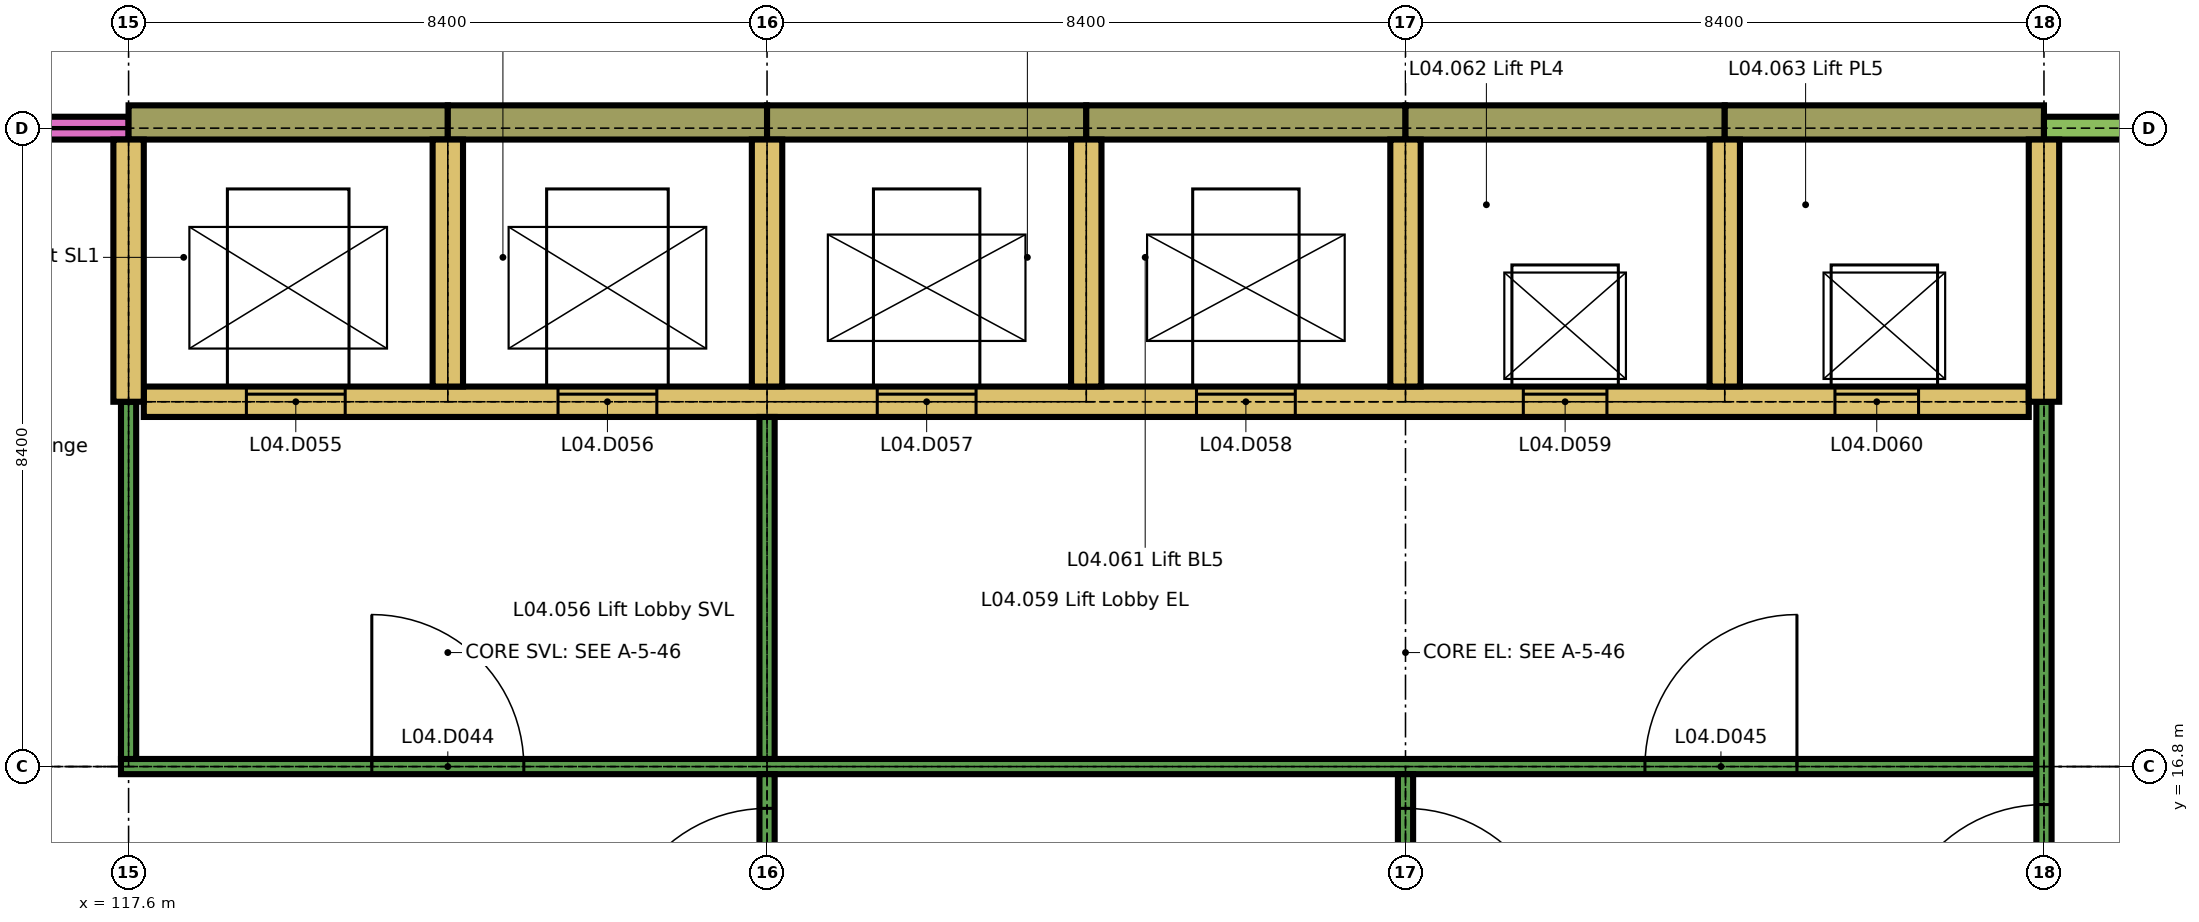
"""IFC4 building model, lengths in metres.
Left out: names, types, materials, properties, quantities, classifications, styles, units other than length and angle.
Written with IfcOpenShell. Run it as: python <this file> out.ifc"""

import sys

from ifc_helpers import new_model, si_unit, direction, frame, frame_2d, origin, place, context, subcontext, project, spatial, rectangle, extrude, element, fill, save


model = new_model("IFC4")
c1 = context("Model", 3, precision=1e-05, world=origin(), true_north=direction((0.0, 1.0)))
c2 = subcontext(c1, "Body", "Model", "MODEL_VIEW")
j1 = project(units=[si_unit("LENGTHUNIT", "METRE"), si_unit("PLANEANGLEUNIT", "RADIAN")], contexts=[c1])
p1 = place(None, origin())
s1 = spatial("IfcSite", under=j1, at=p1, CompositionType="ELEMENT")
p2 = place(p1, origin())
s2 = spatial("IfcBuilding", under=s1, at=p2, CompositionType="ELEMENT")
p3 = place(p2, frame((0.0, 0.0, 18.9)))
s3 = spatial("IfcBuildingStorey", under=s2, at=p3, CompositionType="ELEMENT", Elevation=18.9)
p4 = place(p3, frame((113.4, 25.2, 0.0), z_axis=(0.0, 0.0, 1.0), x_axis=(1.0, 0.0, 0.0)))
e1 = element("IfcWall", 1, at=p4, inside=s3, PredefinedType="SOLIDWALL", context=c2, shape_type="SweptSolid", body=[
    extrude(rectangle(XDim=4.2, YDim=0.3, at=frame_2d((2.1, 0.0))), origin(), (0.0, 0.0, 1.0), 0.6),
])
for number, where, z_axis, x_axis in (
    (2, (117.6, 25.275, 0.0), (0.0, 0.0, 1.0), (1.0, 0.0, 0.0)),
    (3, (121.8, 25.275, 0.0), (0.0, 0.0, 1.0), (1.0, 0.0, 0.0)),
    (4, (126.0, 25.275, 0.0), (0.0, 0.0, 1.0), (1.0, 0.0, 0.0)),
    (5, (130.2, 25.275, 0.0), (0.0, 0.0, 1.0), (1.0, 0.0, 0.0)),
):
    element("IfcWall", number, at=place(p3, frame(where, z_axis=z_axis, x_axis=x_axis)), inside=s3, PredefinedType="SOLIDWALL", context=c2, shape_type="SweptSolid", body=[
        extrude(rectangle(XDim=4.2, YDim=0.45, at=frame_2d((2.1, 0.0))), origin(), (0.0, 0.0, 1.0), 3.26),
    ])
p5 = place(p3, frame((134.4, 25.275, 0.0), z_axis=(0.0, 0.0, 1.0), x_axis=(1.0, 0.0, 0.0)))
e6 = element("IfcWall", 6, at=p5, inside=s3, PredefinedType="SOLIDWALL", context=c2, shape_type="SweptSolid", body=[
    extrude(rectangle(XDim=4.2, YDim=0.45, at=frame_2d((2.1, 0.0))), origin(), (0.0, 0.0, 1.0), 3.26),
])
p6 = place(p3, frame((138.6, 25.275, 0.0), z_axis=(0.0, 0.0, 1.0), x_axis=(1.0, 0.0, 0.0)))
e7 = element("IfcWall", 7, at=p6, inside=s3, PredefinedType="SOLIDWALL", context=c2, shape_type="SweptSolid", body=[
    extrude(rectangle(XDim=4.2, YDim=0.45, at=frame_2d((2.1, 0.0))), origin(), (0.0, 0.0, 1.0), 3.26),
])
p7 = place(p3, frame((142.8, 25.2, 0.0), z_axis=(0.0, 0.0, 1.0), x_axis=(1.0, 0.0, 0.0)))
e8 = element("IfcWall", 8, at=p7, inside=s3, PredefinedType="SOLIDWALL", context=c2, shape_type="SweptSolid", body=[
    extrude(rectangle(XDim=1.3, YDim=0.3, at=frame_2d((0.65, 0.0))), origin(), (0.0, 0.0, 1.0), 2.96),
])
p8 = place(p3, frame((117.5, 16.8, 0.0), z_axis=(0.0, 0.0, 1.0), x_axis=(1.0, 0.0, 0.0)))
e9 = element("IfcWall", 9, at=p8, inside=s3, PredefinedType="PARTITIONING", context=c2, shape_type="SweptSolid", body=[
    extrude(rectangle(XDim=25.2, YDim=0.2, at=frame_2d((12.6, 0.0))), origin(), (0.0, 0.0, 1.0), 3.26),
])
p9 = place(p8, frame((3.3, 0.0, 0.0)))
e10 = element("IfcOpeningElement", 10, at=p9, cuts=e9, PredefinedType="OPENING", context=c2, shape_type="SweptSolid", body=[
    extrude(rectangle(XDim=2.0, YDim=2.4, at=frame_2d((1.0, 1.2))), frame((0.0, 0.11, 0.0), z_axis=(0.0, -1.0, 0.0), x_axis=(1.0, 0.0, 0.0)), (0.0, 0.0, 1.0), 0.22),
])
p10 = place(p8, frame((20.05, 0.0, 0.0)))
e11 = element("IfcOpeningElement", 11, at=p10, cuts=e9, PredefinedType="OPENING", context=c2, shape_type="SweptSolid", body=[
    extrude(rectangle(XDim=2.0, YDim=2.4, at=frame_2d((1.0, 1.2))), frame((0.0, 0.11, 0.0), z_axis=(0.0, -1.0, 0.0), x_axis=(1.0, 0.0, 0.0)), (0.0, 0.0, 1.0), 0.22),
])
p11 = place(p3, frame((117.8, 21.6, 0.0), z_axis=(0.0, 0.0, 1.0), x_axis=(1.0, 0.0, 0.0)))
e12 = element("IfcWall", 12, at=p11, inside=s3, PredefinedType="SHEAR", context=c2, shape_type="SweptSolid", body=[
    extrude(rectangle(XDim=24.8, YDim=0.4, at=frame_2d((12.4, 0.0))), origin(), (0.0, 0.0, 1.0), 3.26),
])
p12 = place(p11, frame((1.35, 0.0, 0.0)))
e13 = element("IfcOpeningElement", 13, at=p12, cuts=e12, PredefinedType="OPENING", context=c2, shape_type="SweptSolid", body=[
    extrude(rectangle(XDim=1.3, YDim=2.1, at=frame_2d((0.65, 1.05))), frame((0.0, 0.21, 0.0), z_axis=(0.0, -1.0, 0.0), x_axis=(1.0, 0.0, 0.0)), (0.0, 0.0, 1.0), 0.42),
])
p13 = place(p11, frame((5.45, 0.0, 0.0)))
e14 = element("IfcOpeningElement", 14, at=p13, cuts=e12, PredefinedType="OPENING", context=c2, shape_type="SweptSolid", body=[
    extrude(rectangle(XDim=1.3, YDim=2.1, at=frame_2d((0.65, 1.05))), frame((0.0, 0.21, 0.0), z_axis=(0.0, -1.0, 0.0), x_axis=(1.0, 0.0, 0.0)), (0.0, 0.0, 1.0), 0.42),
])
p14 = place(p11, frame((9.65, 0.0, 0.0)))
e15 = element("IfcOpeningElement", 15, at=p14, cuts=e12, PredefinedType="OPENING", context=c2, shape_type="SweptSolid", body=[
    extrude(rectangle(XDim=1.3, YDim=2.1, at=frame_2d((0.65, 1.05))), frame((0.0, 0.21, 0.0), z_axis=(0.0, -1.0, 0.0), x_axis=(1.0, 0.0, 0.0)), (0.0, 0.0, 1.0), 0.42),
])
p15 = place(p11, frame((13.85, 0.0, 0.0)))
e16 = element("IfcOpeningElement", 16, at=p15, cuts=e12, PredefinedType="OPENING", context=c2, shape_type="SweptSolid", body=[
    extrude(rectangle(XDim=1.3, YDim=2.1, at=frame_2d((0.65, 1.05))), frame((0.0, 0.21, 0.0), z_axis=(0.0, -1.0, 0.0), x_axis=(1.0, 0.0, 0.0)), (0.0, 0.0, 1.0), 0.42),
])
p16 = place(p11, frame((18.15, 0.0, 0.0)))
e17 = element("IfcOpeningElement", 17, at=p16, cuts=e12, PredefinedType="OPENING", context=c2, shape_type="SweptSolid", body=[
    extrude(rectangle(XDim=1.1, YDim=2.1, at=frame_2d((0.55, 1.05))), frame((0.0, 0.21, 0.0), z_axis=(0.0, -1.0, 0.0), x_axis=(1.0, 0.0, 0.0)), (0.0, 0.0, 1.0), 0.42),
])
p17 = place(p11, frame((22.25, 0.0, 0.0)))
e18 = element("IfcOpeningElement", 18, at=p17, cuts=e12, PredefinedType="OPENING", context=c2, shape_type="SweptSolid", body=[
    extrude(rectangle(XDim=1.1, YDim=2.1, at=frame_2d((0.55, 1.05))), frame((0.0, 0.21, 0.0), z_axis=(0.0, -1.0, 0.0), x_axis=(1.0, 0.0, 0.0)), (0.0, 0.0, 1.0), 0.42),
])
p18 = place(p3, frame((117.6, 16.9, 0.0), z_axis=(0.0, 0.0, 1.0), x_axis=(0.0, 1.0, 0.0)))
e19 = element("IfcWall", 19, at=p18, inside=s3, PredefinedType="PARTITIONING", context=c2, shape_type="SweptSolid", body=[
    extrude(rectangle(XDim=4.7, YDim=0.2, at=frame_2d((2.35, 0.0))), origin(), (0.0, 0.0, 1.0), 3.26),
])
p19 = place(p3, frame((117.6, 21.6, 0.0), z_axis=(0.0, 0.0, 1.0), x_axis=(0.0, 1.0, 0.0)))
e20 = element("IfcWall", 20, at=p19, inside=s3, PredefinedType="SHEAR", context=c2, shape_type="SweptSolid", body=[
    extrude(rectangle(XDim=3.45, YDim=0.4, at=frame_2d((1.725, 0.0))), origin(), (0.0, 0.0, 1.0), 3.26),
])
p20 = place(p3, frame((121.8, 21.8, 0.0), z_axis=(0.0, 0.0, 1.0), x_axis=(0.0, 1.0, 0.0)))
e21 = element("IfcWall", 21, at=p20, inside=s3, PredefinedType="SHEAR", context=c2, shape_type="SweptSolid", body=[
    extrude(rectangle(XDim=3.25, YDim=0.4, at=frame_2d((1.625, 0.0))), origin(), (0.0, 0.0, 1.0), 3.26),
])
p21 = place(p3, frame((126.0, 8.775, 0.0), z_axis=(0.0, 0.0, 1.0), x_axis=(0.0, 1.0, 0.0)))
e22 = element("IfcWall", 22, at=p21, inside=s3, PredefinedType="PARTITIONING", context=c2, shape_type="SweptSolid", body=[
    extrude(rectangle(XDim=7.925, YDim=0.2, at=frame_2d((3.962, 0.0))), origin(), (0.0, 0.0, 1.0), 3.26),
])
p22 = place(p21, frame((0.312, 0.0, 0.0)))
e23 = element("IfcOpeningElement", 23, at=p22, cuts=e22, PredefinedType="OPENING", context=c2, shape_type="SweptSolid", body=[
    extrude(rectangle(XDim=2.0, YDim=2.4, at=frame_2d((1.0, 1.2))), frame((0.0, 0.11, 0.0), z_axis=(0.0, -1.0, 0.0), x_axis=(1.0, 0.0, 0.0)), (0.0, 0.0, 1.0), 0.22),
])
p23 = place(p21, frame((5.475, 0.0, 0.0)))
e24 = element("IfcOpeningElement", 24, at=p23, cuts=e22, PredefinedType="OPENING", context=c2, shape_type="SweptSolid", body=[
    extrude(rectangle(XDim=2.0, YDim=2.4, at=frame_2d((1.0, 1.2))), frame((0.0, 0.11, 0.0), z_axis=(0.0, -1.0, 0.0), x_axis=(1.0, 0.0, 0.0)), (0.0, 0.0, 1.0), 0.22),
])
p24 = place(p3, frame((126.0, 16.9, 0.0), z_axis=(0.0, 0.0, 1.0), x_axis=(0.0, 1.0, 0.0)))
e25 = element("IfcWall", 25, at=p24, inside=s3, PredefinedType="PARTITIONING", context=c2, shape_type="SweptSolid", body=[
    extrude(rectangle(XDim=4.5, YDim=0.2, at=frame_2d((2.25, 0.0))), origin(), (0.0, 0.0, 1.0), 3.26),
])
for number, where, z_axis, x_axis in (
    (26, (126.0, 21.8, 0.0), (0.0, 0.0, 1.0), (0.0, 1.0, 0.0)),
    (27, (130.2, 21.8, 0.0), (0.0, 0.0, 1.0), (0.0, 1.0, 0.0)),
):
    element("IfcWall", number, at=place(p3, frame(where, z_axis=z_axis, x_axis=x_axis)), inside=s3, PredefinedType="SHEAR", context=c2, shape_type="SweptSolid", body=[
        extrude(rectangle(XDim=3.25, YDim=0.4, at=frame_2d((1.625, 0.0))), origin(), (0.0, 0.0, 1.0), 3.26),
    ])
p25 = place(p3, frame((134.4, 3.6, 0.0), z_axis=(0.0, 0.0, 1.0), x_axis=(0.0, 1.0, 0.0)))
e28 = element("IfcWall", 28, at=p25, inside=s3, PredefinedType="PARTITIONING", context=c2, shape_type="SweptSolid", body=[
    extrude(rectangle(XDim=13.1, YDim=0.2, at=frame_2d((6.55, 0.0))), origin(), (0.0, 0.0, 1.0), 3.26),
])
p26 = place(p25, frame((5.3, 0.0, 0.0)))
e29 = element("IfcOpeningElement", 29, at=p26, cuts=e28, PredefinedType="OPENING", context=c2, shape_type="SweptSolid", body=[
    extrude(rectangle(XDim=2.0, YDim=2.4, at=frame_2d((1.0, 1.2))), frame((0.0, 0.11, 0.0), z_axis=(0.0, -1.0, 0.0), x_axis=(1.0, 0.0, 0.0)), (0.0, 0.0, 1.0), 0.22),
])
p27 = place(p25, frame((10.65, 0.0, 0.0)))
e30 = element("IfcOpeningElement", 30, at=p27, cuts=e28, PredefinedType="OPENING", context=c2, shape_type="SweptSolid", body=[
    extrude(rectangle(XDim=2.0, YDim=2.4, at=frame_2d((1.0, 1.2))), frame((0.0, 0.11, 0.0), z_axis=(0.0, -1.0, 0.0), x_axis=(1.0, 0.0, 0.0)), (0.0, 0.0, 1.0), 0.22),
])
for number, where, z_axis, x_axis in (
    (31, (134.4, 21.8, 0.0), (0.0, 0.0, 1.0), (0.0, 1.0, 0.0)),
    (32, (138.6, 21.8, 0.0), (0.0, 0.0, 1.0), (0.0, 1.0, 0.0)),
):
    element("IfcWall", number, at=place(p3, frame(where, z_axis=z_axis, x_axis=x_axis)), inside=s3, PredefinedType="SHEAR", context=c2, shape_type="SweptSolid", body=[
        extrude(rectangle(XDim=3.25, YDim=0.4, at=frame_2d((1.625, 0.0))), origin(), (0.0, 0.0, 1.0), 3.26),
    ])
p28 = place(p3, frame((142.8, 3.6, 0.0), z_axis=(0.0, 0.0, 1.0), x_axis=(0.0, 1.0, 0.0)))
e33 = element("IfcWall", 33, at=p28, inside=s3, PredefinedType="PARTITIONING", context=c2, shape_type="SweptSolid", body=[
    extrude(rectangle(XDim=18.0, YDim=0.2, at=frame_2d((9.0, 0.0))), origin(), (0.0, 0.0, 1.0), 3.26),
])
p29 = place(p28, frame((5.3, 0.0, 0.0)))
e34 = element("IfcOpeningElement", 34, at=p29, cuts=e33, PredefinedType="OPENING", context=c2, shape_type="SweptSolid", body=[
    extrude(rectangle(XDim=2.0, YDim=2.4, at=frame_2d((1.0, 1.2))), frame((0.0, 0.11, 0.0), z_axis=(0.0, -1.0, 0.0), x_axis=(1.0, 0.0, 0.0)), (0.0, 0.0, 1.0), 0.22),
])
p30 = place(p28, frame((10.7, 0.0, 0.0)))
e35 = element("IfcOpeningElement", 35, at=p30, cuts=e33, PredefinedType="OPENING", context=c2, shape_type="SweptSolid", body=[
    extrude(rectangle(XDim=2.0, YDim=2.4, at=frame_2d((1.0, 1.2))), frame((0.0, 0.11, 0.0), z_axis=(0.0, -1.0, 0.0), x_axis=(1.0, 0.0, 0.0)), (0.0, 0.0, 1.0), 0.22),
])
p31 = place(p3, frame((142.8, 21.6, 0.0), z_axis=(0.0, 0.0, 1.0), x_axis=(0.0, 1.0, 0.0)))
e36 = element("IfcWall", 36, at=p31, inside=s3, PredefinedType="SHEAR", context=c2, shape_type="SweptSolid", body=[
    extrude(rectangle(XDim=3.45, YDim=0.4, at=frame_2d((1.725, 0.0))), origin(), (0.0, 0.0, 1.0), 3.26),
])
p32 = place(p9, origin())
e37 = element("IfcDoor", 37, at=p32, inside=s3, OperationType="SINGLE_SWING_RIGHT", PredefinedType="DOOR", context=c2, shape_type="SweptSolid", body=[
    extrude(rectangle(XDim=2.0, YDim=2.4, at=frame_2d((1.0, 1.2))), frame((0.0, 0.03, 0.0), z_axis=(0.0, -1.0, 0.0), x_axis=(1.0, 0.0, 0.0)), (0.0, 0.0, 1.0), 0.06),
])
fill(e10, e37)
p33 = place(p10, origin())
e38 = element("IfcDoor", 38, at=p33, inside=s3, OperationType="SINGLE_SWING_LEFT", PredefinedType="DOOR", context=c2, shape_type="SweptSolid", body=[
    extrude(rectangle(XDim=2.0, YDim=2.4, at=frame_2d((1.0, 1.2))), frame((0.0, 0.03, 0.0), z_axis=(0.0, -1.0, 0.0), x_axis=(1.0, 0.0, 0.0)), (0.0, 0.0, 1.0), 0.06),
])
fill(e11, e38)
p34 = place(p12, origin())
e39 = element("IfcDoor", 39, at=p34, inside=s3, OperationType="SLIDING_TO_LEFT", PredefinedType="DOOR", context=c2, shape_type="SweptSolid", body=[
    extrude(rectangle(XDim=1.3, YDim=2.1, at=frame_2d((0.65, 1.05))), frame((0.0, 0.025, 0.0), z_axis=(0.0, -1.0, 0.0), x_axis=(1.0, 0.0, 0.0)), (0.0, 0.0, 1.0), 0.05),
])
fill(e13, e39)
p35 = place(p13, origin())
e40 = element("IfcDoor", 40, at=p35, inside=s3, OperationType="SLIDING_TO_LEFT", PredefinedType="DOOR", context=c2, shape_type="SweptSolid", body=[
    extrude(rectangle(XDim=1.3, YDim=2.1, at=frame_2d((0.65, 1.05))), frame((0.0, 0.025, 0.0), z_axis=(0.0, -1.0, 0.0), x_axis=(1.0, 0.0, 0.0)), (0.0, 0.0, 1.0), 0.05),
])
fill(e14, e40)
p36 = place(p14, origin())
e41 = element("IfcDoor", 41, at=p36, inside=s3, OperationType="SLIDING_TO_LEFT", PredefinedType="DOOR", context=c2, shape_type="SweptSolid", body=[
    extrude(rectangle(XDim=1.3, YDim=2.1, at=frame_2d((0.65, 1.05))), frame((0.0, 0.025, 0.0), z_axis=(0.0, -1.0, 0.0), x_axis=(1.0, 0.0, 0.0)), (0.0, 0.0, 1.0), 0.05),
])
fill(e15, e41)
p37 = place(p15, origin())
e42 = element("IfcDoor", 42, at=p37, inside=s3, OperationType="SLIDING_TO_LEFT", PredefinedType="DOOR", context=c2, shape_type="SweptSolid", body=[
    extrude(rectangle(XDim=1.3, YDim=2.1, at=frame_2d((0.65, 1.05))), frame((0.0, 0.025, 0.0), z_axis=(0.0, -1.0, 0.0), x_axis=(1.0, 0.0, 0.0)), (0.0, 0.0, 1.0), 0.05),
])
fill(e16, e42)
p38 = place(p16, origin())
e43 = element("IfcDoor", 43, at=p38, inside=s3, OperationType="SLIDING_TO_LEFT", PredefinedType="DOOR", context=c2, shape_type="SweptSolid", body=[
    extrude(rectangle(XDim=1.1, YDim=2.1, at=frame_2d((0.55, 1.05))), frame((0.0, 0.025, 0.0), z_axis=(0.0, -1.0, 0.0), x_axis=(1.0, 0.0, 0.0)), (0.0, 0.0, 1.0), 0.05),
])
fill(e17, e43)
p39 = place(p17, origin())
e44 = element("IfcDoor", 44, at=p39, inside=s3, OperationType="SLIDING_TO_LEFT", PredefinedType="DOOR", context=c2, shape_type="SweptSolid", body=[
    extrude(rectangle(XDim=1.1, YDim=2.1, at=frame_2d((0.55, 1.05))), frame((0.0, 0.025, 0.0), z_axis=(0.0, -1.0, 0.0), x_axis=(1.0, 0.0, 0.0)), (0.0, 0.0, 1.0), 0.05),
])
fill(e18, e44)
p40 = place(p23, origin())
e45 = element("IfcDoor", 45, at=p40, inside=s3, OperationType="SINGLE_SWING_RIGHT", PredefinedType="DOOR", context=c2, shape_type="SweptSolid", body=[
    extrude(rectangle(XDim=2.0, YDim=2.4, at=frame_2d((1.0, 1.2))), frame((0.0, 0.03, 0.0), z_axis=(0.0, -1.0, 0.0), x_axis=(1.0, 0.0, 0.0)), (0.0, 0.0, 1.0), 0.06),
])
fill(e24, e45)
p41 = place(p27, origin())
e46 = element("IfcDoor", 46, at=p41, inside=s3, OperationType="SINGLE_SWING_LEFT", PredefinedType="DOOR", context=c2, shape_type="SweptSolid", body=[
    extrude(rectangle(XDim=2.0, YDim=2.4, at=frame_2d((1.0, 1.2))), frame((0.0, 0.03, 0.0), z_axis=(0.0, -1.0, 0.0), x_axis=(1.0, 0.0, 0.0)), (0.0, 0.0, 1.0), 0.06),
])
fill(e30, e46)
p42 = place(p30, origin())
e47 = element("IfcDoor", 47, at=p42, inside=s3, OperationType="SINGLE_SWING_RIGHT", PredefinedType="DOOR", context=c2, shape_type="SweptSolid", body=[
    extrude(rectangle(XDim=2.0, YDim=2.4, at=frame_2d((1.0, 1.2))), frame((0.0, 0.03, 0.0), z_axis=(0.0, -1.0, 0.0), x_axis=(1.0, 0.0, 0.0)), (0.0, 0.0, 1.0), 0.06),
])
fill(e35, e47)
save(model, sys.argv[1])
